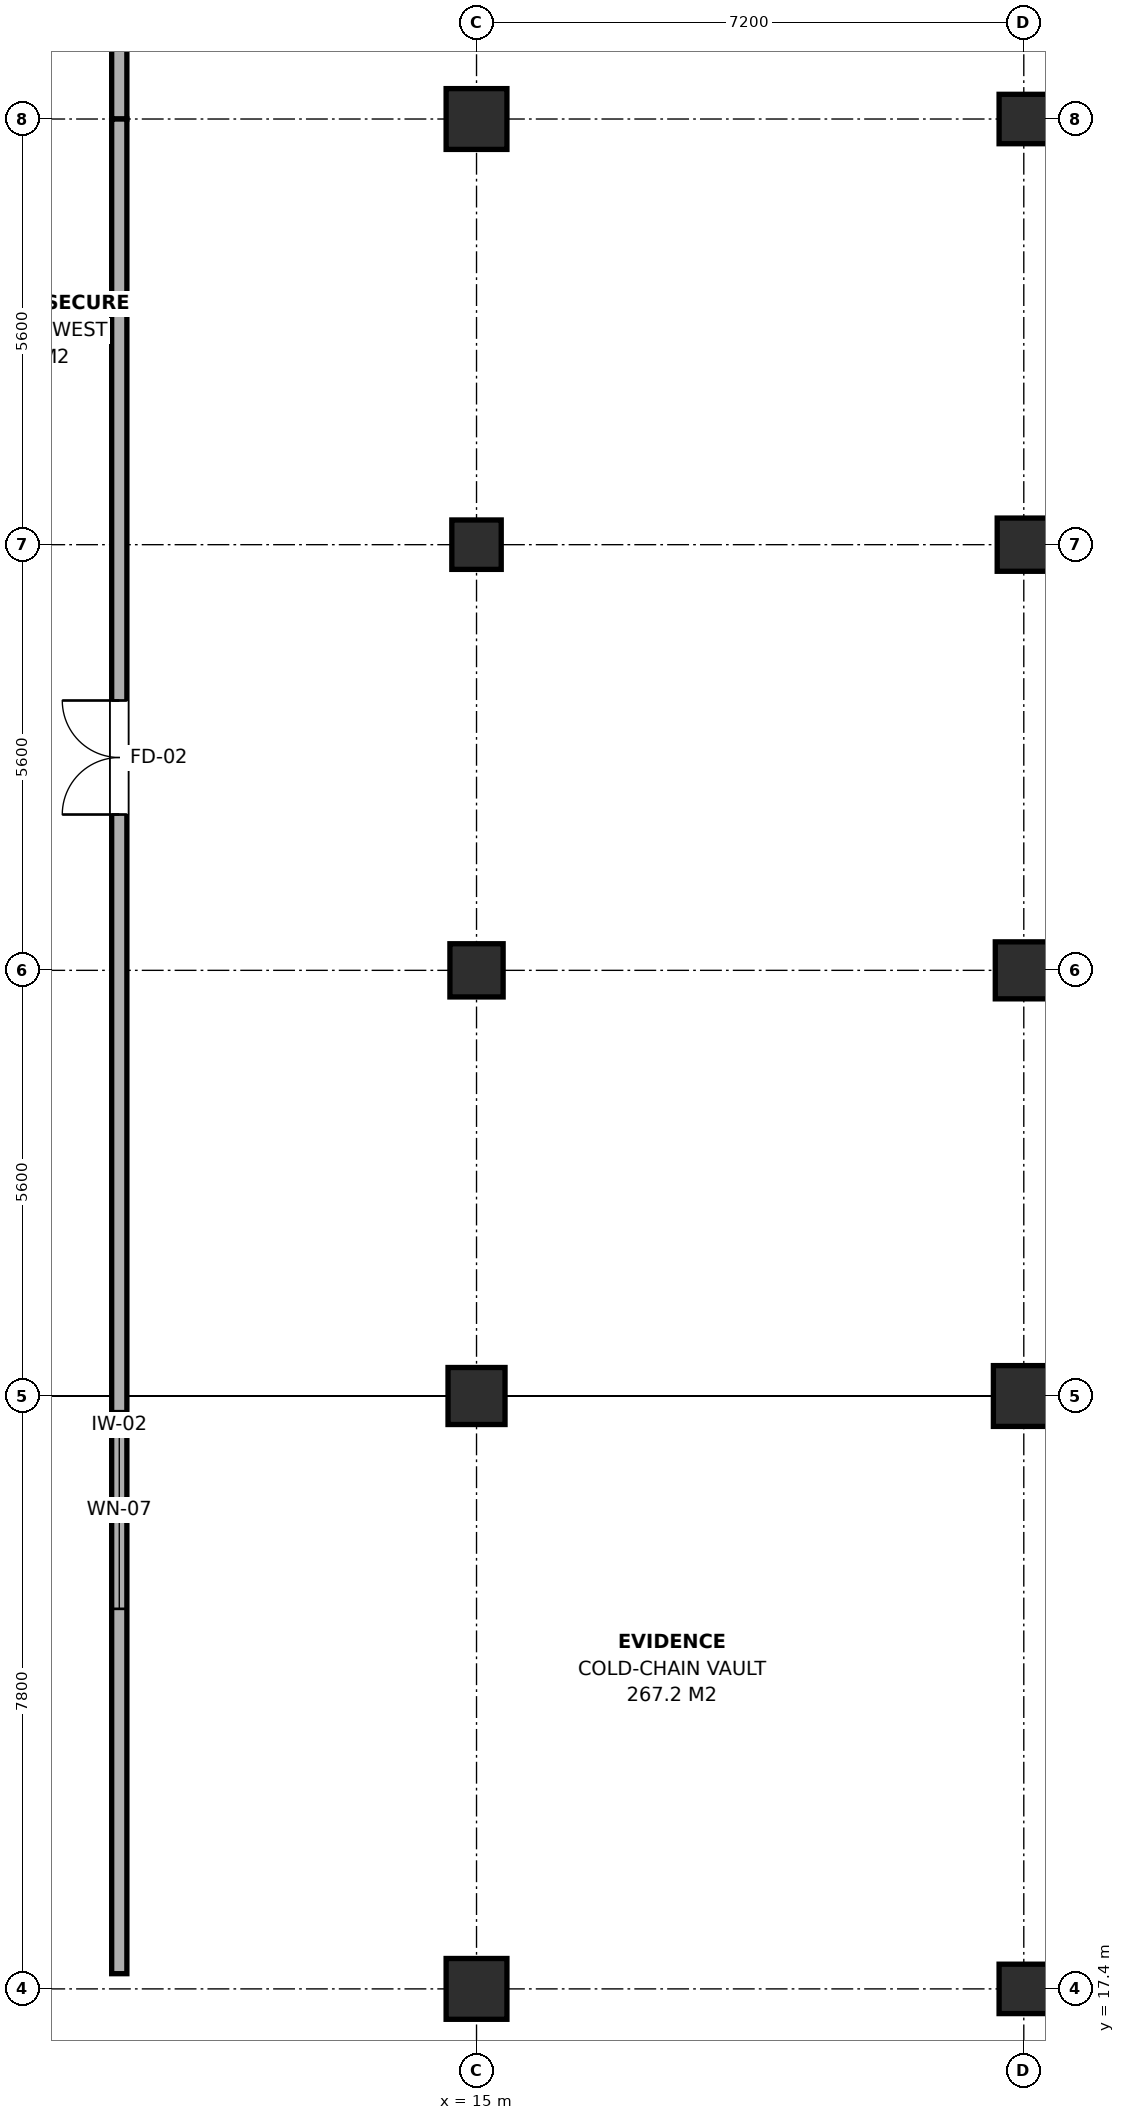
"""IFC4 building model, lengths in metres.
Left out: names, types, materials, properties, quantities, classifications, styles, units other than length and angle.
Written with IfcOpenShell. Run it as: python <this file> out.ifc"""

import sys

from ifc_helpers import new_model, si_unit, direction, frame, frame_2d, origin, origin_2d, place, context, subcontext, project, spatial, rectangle, extrude, element, fill, save


model = new_model("IFC4")
c1 = context("Model", 3, precision=1e-05, world=origin(), true_north=direction((0.0, 1.0)))
c2 = subcontext(c1, "Body", "Model", "MODEL_VIEW")
j1 = project(units=[si_unit("LENGTHUNIT", "METRE"), si_unit("PLANEANGLEUNIT", "RADIAN")], contexts=[c1])
p1 = place(None, origin())
s1 = spatial("IfcSite", under=j1, at=p1, CompositionType="ELEMENT")
p2 = place(p1, origin())
s2 = spatial("IfcBuilding", under=s1, at=p2, CompositionType="ELEMENT")
p3 = place(p2, frame((0.0, 0.0, -4.2)))
s3 = spatial("IfcBuildingStorey", under=s2, at=p3, CompositionType="ELEMENT", Elevation=-4.2)
p4 = place(p3, frame((15.0, 17.4, 0.0), z_axis=(0.0, 0.0, 1.0), x_axis=(1.0, 0.0, 0.0)))
e1 = element("IfcColumn", 1, at=p4, inside=s3, PredefinedType="COLUMN", context=c2, shape_type="SweptSolid", body=[
    extrude(rectangle(XDim=0.8, YDim=0.8, at=origin_2d()), origin(), (0.0, 0.0, 1.0), 4.2),
])
p5 = place(p3, frame((15.0, 25.2, 0.0), z_axis=(0.0, 0.0, 1.0), x_axis=(1.0, 0.0, 0.0)))
e2 = element("IfcColumn", 2, at=p5, inside=s3, PredefinedType="COLUMN", context=c2, shape_type="SweptSolid", body=[
    extrude(rectangle(XDim=0.75, YDim=0.75, at=origin_2d()), origin(), (0.0, 0.0, 1.0), 4.2),
])
p6 = place(p3, frame((15.0, 30.8, 0.0), z_axis=(0.0, 0.0, 1.0), x_axis=(1.0, 0.0, 0.0)))
e3 = element("IfcColumn", 3, at=p6, inside=s3, PredefinedType="COLUMN", context=c2, shape_type="SweptSolid", body=[
    extrude(rectangle(XDim=0.7, YDim=0.7, at=origin_2d()), origin(), (0.0, 0.0, 1.0), 4.2),
])
p7 = place(p3, frame((15.0, 36.4, 0.0), z_axis=(0.0, 0.0, 1.0), x_axis=(1.0, 0.0, 0.0)))
e4 = element("IfcColumn", 4, at=p7, inside=s3, PredefinedType="COLUMN", context=c2, shape_type="SweptSolid", body=[
    extrude(rectangle(XDim=0.65, YDim=0.65, at=origin_2d()), origin(), (0.0, 0.0, 1.0), 4.2),
])
p8 = place(p3, frame((15.0, 42.0, 0.0), z_axis=(0.0, 0.0, 1.0), x_axis=(1.0, 0.0, 0.0)))
e5 = element("IfcColumn", 5, at=p8, inside=s3, PredefinedType="COLUMN", context=c2, shape_type="SweptSolid", body=[
    extrude(rectangle(XDim=0.8, YDim=0.8, at=origin_2d()), origin(), (0.0, 0.0, 1.0), 4.2),
])
p9 = place(p3, frame((22.2, 17.4, 0.0), z_axis=(0.0, 0.0, 1.0), x_axis=(1.0, 0.0, 0.0)))
e6 = element("IfcColumn", 6, at=p9, inside=s3, PredefinedType="COLUMN", context=c2, shape_type="SweptSolid", body=[
    extrude(rectangle(XDim=0.65, YDim=0.65, at=origin_2d()), origin(), (0.0, 0.0, 1.0), 4.2),
])
p10 = place(p3, frame((22.2, 25.2, 0.0), z_axis=(0.0, 0.0, 1.0), x_axis=(1.0, 0.0, 0.0)))
e7 = element("IfcColumn", 7, at=p10, inside=s3, PredefinedType="COLUMN", context=c2, shape_type="SweptSolid", body=[
    extrude(rectangle(XDim=0.8, YDim=0.8, at=origin_2d()), origin(), (0.0, 0.0, 1.0), 4.2),
])
p11 = place(p3, frame((22.2, 30.8, 0.0), z_axis=(0.0, 0.0, 1.0), x_axis=(1.0, 0.0, 0.0)))
e8 = element("IfcColumn", 8, at=p11, inside=s3, PredefinedType="COLUMN", context=c2, shape_type="SweptSolid", body=[
    extrude(rectangle(XDim=0.75, YDim=0.75, at=origin_2d()), origin(), (0.0, 0.0, 1.0), 4.2),
])
p12 = place(p3, frame((22.2, 36.4, 0.0), z_axis=(0.0, 0.0, 1.0), x_axis=(1.0, 0.0, 0.0)))
e9 = element("IfcColumn", 9, at=p12, inside=s3, PredefinedType="COLUMN", context=c2, shape_type="SweptSolid", body=[
    extrude(rectangle(XDim=0.7, YDim=0.7, at=origin_2d()), origin(), (0.0, 0.0, 1.0), 4.2),
])
p13 = place(p3, frame((22.2, 42.0, 0.0), z_axis=(0.0, 0.0, 1.0), x_axis=(1.0, 0.0, 0.0)))
e10 = element("IfcColumn", 10, at=p13, inside=s3, PredefinedType="COLUMN", context=c2, shape_type="SweptSolid", body=[
    extrude(rectangle(XDim=0.65, YDim=0.65, at=origin_2d()), origin(), (0.0, 0.0, 1.0), 4.2),
])
p14 = place(p3, frame((10.3, 42.0, 0.0), z_axis=(0.0, 0.0, 1.0), x_axis=(0.0, 1.0, 0.0)))
e11 = element("IfcWall", 11, at=p14, inside=s3, PredefinedType="PARTITIONING", context=c2, shape_type="SweptSolid", body=[
    extrude(rectangle(XDim=24.6, YDim=0.2, at=frame_2d((12.3, 0.0))), origin(), (0.0, 0.0, 1.0), 3.315),
])
p15 = place(p14, frame((7.9, 0.0, 0.0)))
e12 = element("IfcOpeningElement", 12, at=p15, cuts=e11, PredefinedType="OPENING", context=c2, shape_type="SweptSolid", body=[
    extrude(rectangle(XDim=1.0, YDim=2.15, at=frame_2d((0.5, 1.075))), frame((0.0, 0.115, 0.0), z_axis=(0.0, -1.0, 0.0), x_axis=(1.0, 0.0, 0.0)), (0.0, 0.0, 1.0), 0.23),
])
p16 = place(p14, frame((4.85, 0.0, 0.95)))
e13 = element("IfcOpeningElement", 13, at=p16, cuts=e11, PredefinedType="OPENING", context=c2, shape_type="SweptSolid", body=[
    extrude(rectangle(XDim=2.6, YDim=1.5, at=frame_2d((1.3, 0.75))), frame((0.0, 0.115, 0.0), z_axis=(0.0, -1.0, 0.0), x_axis=(1.0, 0.0, 0.0)), (0.0, 0.0, 1.0), 0.23),
])
p17 = place(p14, frame((17.15, 0.0, 0.95)))
e14 = element("IfcOpeningElement", 14, at=p17, cuts=e11, PredefinedType="OPENING", context=c2, shape_type="SweptSolid", body=[
    extrude(rectangle(XDim=2.6, YDim=1.5, at=frame_2d((1.3, 0.75))), frame((0.0, 0.115, 0.0), z_axis=(0.0, -1.0, 0.0), x_axis=(1.0, 0.0, 0.0)), (0.0, 0.0, 1.0), 0.23),
])
p18 = place(p3, frame((10.3, 17.6, 0.0), z_axis=(0.0, 0.0, 1.0), x_axis=(0.0, 1.0, 0.0)))
e15 = element("IfcWall", 15, at=p18, inside=s3, PredefinedType="PARTITIONING", context=c2, shape_type="SweptSolid", body=[
    extrude(rectangle(XDim=24.4, YDim=0.2, at=frame_2d((12.2, 0.0))), origin(), (0.0, 0.0, 1.0), 3.265),
])
p19 = place(p18, frame((15.25, 0.0, 0.0)))
e16 = element("IfcOpeningElement", 16, at=p19, cuts=e15, PredefinedType="OPENING", context=c2, shape_type="SweptSolid", body=[
    extrude(rectangle(XDim=1.5, YDim=2.15, at=frame_2d((0.75, 1.075))), frame((0.0, 0.115, 0.0), z_axis=(0.0, -1.0, 0.0), x_axis=(1.0, 0.0, 0.0)), (0.0, 0.0, 1.0), 0.23),
])
p20 = place(p18, frame((4.8, 0.0, 0.95)))
e17 = element("IfcOpeningElement", 17, at=p20, cuts=e15, PredefinedType="OPENING", context=c2, shape_type="SweptSolid", body=[
    extrude(rectangle(XDim=2.6, YDim=1.5, at=frame_2d((1.3, 0.75))), frame((0.0, 0.115, 0.0), z_axis=(0.0, -1.0, 0.0), x_axis=(1.0, 0.0, 0.0)), (0.0, 0.0, 1.0), 0.23),
])
p21 = place(p19, origin())
e18 = element("IfcDoor", 18, at=p21, inside=s3, OperationType="DOUBLE_DOOR_SINGLE_SWING", PredefinedType="DOOR", context=c2, shape_type="SweptSolid", body=[
    extrude(rectangle(XDim=1.5, YDim=2.15, at=frame_2d((0.75, 1.075))), frame((0.0, 0.025, 0.0), z_axis=(0.0, -1.0, 0.0), x_axis=(1.0, 0.0, 0.0)), (0.0, 0.0, 1.0), 0.05),
])
fill(e16, e18)
p22 = place(p20, origin())
e19 = element("IfcWindow", 19, at=p22, inside=s3, PartitioningType="SINGLE_PANEL", PredefinedType="WINDOW", context=c2, shape_type="SweptSolid", body=[
    extrude(rectangle(XDim=2.6, YDim=1.5, at=frame_2d((1.3, 0.75))), frame((0.0, 0.03, 0.0), z_axis=(0.0, -1.0, 0.0), x_axis=(1.0, 0.0, 0.0)), (0.0, 0.0, 1.0), 0.06),
])
fill(e17, e19)
save(model, sys.argv[1])
